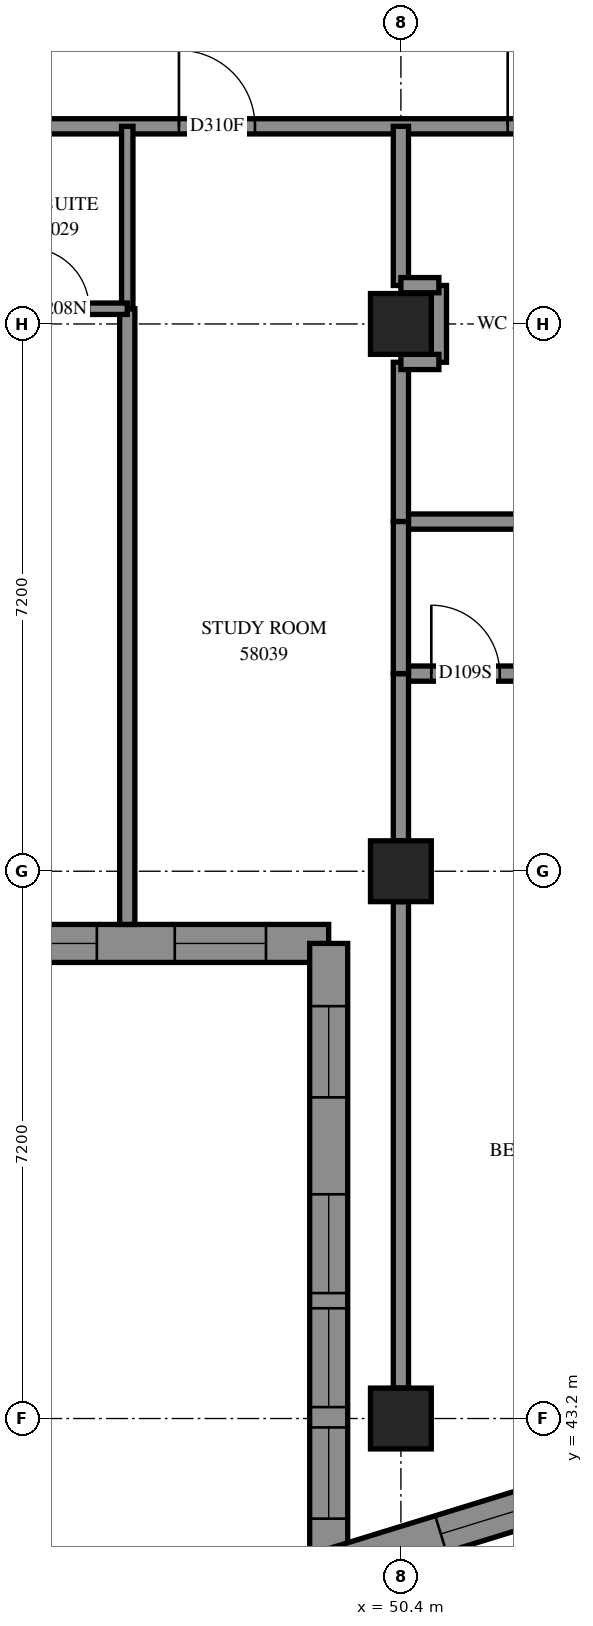
"""IFC4 building model, lengths in metres.
Left out: names, types, materials, properties, quantities, classifications, styles, units other than length and angle.
Written with IfcOpenShell. Run it as: python <this file> out.ifc"""

import sys

from ifc_helpers import new_model, si_unit, direction, frame, frame_2d, origin, origin_2d, place, context, subcontext, project, spatial, polyline, rectangle, outline, extrude, element, fill, save


model = new_model("IFC4")
c1 = context("Model", 3, precision=1e-05, world=origin(), true_north=direction((0.0, 1.0)))
c2 = subcontext(c1, "Body", "Model", "MODEL_VIEW")
j1 = project(units=[si_unit("LENGTHUNIT", "METRE"), si_unit("PLANEANGLEUNIT", "RADIAN")], contexts=[c1])
p1 = place(None, origin())
s1 = spatial("IfcSite", under=j1, at=p1, CompositionType="ELEMENT")
p2 = place(p1, origin())
s2 = spatial("IfcBuilding", under=s1, at=p2, CompositionType="ELEMENT")
p3 = place(p2, frame((0.0, 0.0, 213.4)))
s3 = spatial("IfcBuildingStorey", under=s2, at=p3, CompositionType="ELEMENT", Elevation=213.4)
for number, where, z_axis, x_axis in (
    (1, (50.4, 43.2, 0.0), (0.0, 0.0, 1.0), (1.0, 0.0, 0.0)),
    (2, (50.4, 50.4, 0.0), (0.0, 0.0, 1.0), (1.0, 0.0, 0.0)),
    (3, (50.4, 57.6, 0.0), (0.0, 0.0, 1.0), (1.0, 0.0, 0.0)),
):
    element("IfcColumn", number, at=place(p3, frame(where, z_axis=z_axis, x_axis=x_axis)), inside=s3, PredefinedType="COLUMN", context=c2, shape_type="SweptSolid", body=[
        extrude(rectangle(XDim=0.8, YDim=0.8, at=origin_2d()), origin(), (0.0, 0.0, 1.0), 3.1),
    ])
p4 = place(p3, frame((42.25, 49.45, 0.0), z_axis=(0.0, 0.0, 1.0), x_axis=(1.0, 0.0, 0.0)))
e4 = element("IfcWall", 4, at=p4, inside=s3, PredefinedType="SOLIDWALL", context=c2, shape_type="SweptSolid", body=[
    extrude(outline(polyline([(-0.25, -0.25), (6.95, -0.25), (7.45, 0.25), (0.25, 0.25), (-0.25, -0.25)])), origin(), (0.0, 0.0, 1.0), 3.1),
])
p5 = place(p4, frame((1.35, 0.0, 0.45)))
e5 = element("IfcOpeningElement", 5, at=p5, cuts=e4, PredefinedType="OPENING", context=c2, shape_type="SweptSolid", body=[
    extrude(rectangle(XDim=1.3, YDim=2.5, at=frame_2d((0.65, 1.25))), frame((0.0, 0.26, 0.0), z_axis=(0.0, -1.0, 0.0), x_axis=(1.0, 0.0, 0.0)), (0.0, 0.0, 1.0), 0.52),
])
p6 = place(p4, frame((2.85, 0.0, 0.45)))
e6 = element("IfcOpeningElement", 6, at=p6, cuts=e4, PredefinedType="OPENING", context=c2, shape_type="SweptSolid", body=[
    extrude(rectangle(XDim=1.3, YDim=2.5, at=frame_2d((0.65, 1.25))), frame((0.0, 0.26, 0.0), z_axis=(0.0, -1.0, 0.0), x_axis=(1.0, 0.0, 0.0)), (0.0, 0.0, 1.0), 0.52),
])
p7 = place(p4, frame((5.175, 0.0, 0.45)))
e7 = element("IfcOpeningElement", 7, at=p7, cuts=e4, PredefinedType="OPENING", context=c2, shape_type="SweptSolid", body=[
    extrude(rectangle(XDim=1.2, YDim=2.5, at=frame_2d((0.6, 1.25))), frame((0.0, 0.26, 0.0), z_axis=(0.0, -1.0, 0.0), x_axis=(1.0, 0.0, 0.0)), (0.0, 0.0, 1.0), 0.52),
])
p8 = place(p3, frame((49.45, 49.45, 0.0), z_axis=(0.0, 0.0, 1.0), x_axis=(0.0, -1.0, 0.0)))
e8 = element("IfcWall", 8, at=p8, inside=s3, PredefinedType="SOLIDWALL", context=c2, shape_type="SweptSolid", body=[
    extrude(outline(polyline([(0.25, -0.25), (8.562, -0.25), (7.885, 0.25), (-0.25, 0.25), (0.25, -0.25)])), origin(), (0.0, 0.0, 1.0), 3.1),
])
p9 = place(p8, frame((3.3, 0.0, 0.45)))
e9 = element("IfcOpeningElement", 9, at=p9, cuts=e8, PredefinedType="OPENING", context=c2, shape_type="SweptSolid", body=[
    extrude(rectangle(XDim=1.3, YDim=2.5, at=frame_2d((0.65, 1.25))), frame((0.0, 0.26, 0.0), z_axis=(0.0, -1.0, 0.0), x_axis=(1.0, 0.0, 0.0)), (0.0, 0.0, 1.0), 0.52),
])
p10 = place(p8, frame((4.8, 0.0, 0.45)))
e10 = element("IfcOpeningElement", 10, at=p10, cuts=e8, PredefinedType="OPENING", context=c2, shape_type="SweptSolid", body=[
    extrude(rectangle(XDim=1.3, YDim=2.5, at=frame_2d((0.65, 1.25))), frame((0.0, 0.26, 0.0), z_axis=(0.0, -1.0, 0.0), x_axis=(1.0, 0.0, 0.0)), (0.0, 0.0, 1.0), 0.52),
])
p11 = place(p8, frame((0.825, 0.0, 0.45)))
e11 = element("IfcOpeningElement", 11, at=p11, cuts=e8, PredefinedType="OPENING", context=c2, shape_type="SweptSolid", body=[
    extrude(rectangle(XDim=1.2, YDim=2.5, at=frame_2d((0.6, 1.25))), frame((0.0, 0.26, 0.0), z_axis=(0.0, -1.0, 0.0), x_axis=(1.0, 0.0, 0.0)), (0.0, 0.0, 1.0), 0.52),
])
p12 = place(p8, frame((6.367, 0.0, 0.45)))
e12 = element("IfcOpeningElement", 12, at=p12, cuts=e8, PredefinedType="OPENING", context=c2, shape_type="SweptSolid", body=[
    extrude(rectangle(XDim=1.2, YDim=2.5, at=frame_2d((0.6, 1.25))), frame((0.0, 0.26, 0.0), z_axis=(0.0, -1.0, 0.0), x_axis=(1.0, 0.0, 0.0)), (0.0, 0.0, 1.0), 0.52),
])
p13 = place(p3, frame((49.45, 41.227, 0.0), z_axis=(0.0, 0.0, 1.0), x_axis=(0.9556476946, 0.2945122812, 0.0)))
e13 = element("IfcWall", 13, at=p13, inside=s3, PredefinedType="SOLIDWALL", context=c2, shape_type="SweptSolid", body=[
    extrude(outline(polyline([(-0.339, -0.25), (3.437, -0.25), (3.549, 0.25), (0.339, 0.25), (-0.339, -0.25)])), origin(), (0.0, 0.0, 1.0), 3.1),
])
p14 = place(p13, frame((1.544, 0.0, 0.45)))
e14 = element("IfcOpeningElement", 14, at=p14, cuts=e13, PredefinedType="OPENING", context=c2, shape_type="SweptSolid", body=[
    extrude(rectangle(XDim=1.2, YDim=2.5, at=frame_2d((0.6, 1.25))), frame((0.0, 0.26, 0.0), z_axis=(0.0, -1.0, 0.0), x_axis=(1.0, 0.0, 0.0)), (0.0, 0.0, 1.0), 0.52),
])
p15 = place(p3, frame((36.0, 60.2, 0.0), z_axis=(0.0, 0.0, 1.0), x_axis=(1.0, 0.0, 0.0)))
e15 = element("IfcWall", 15, at=p15, inside=s3, PredefinedType="PARTITIONING", context=c2, shape_type="SweptSolid", body=[
    extrude(rectangle(XDim=17.0, YDim=0.2, at=frame_2d((8.5, 0.0))), origin(), (0.0, 0.0, 1.0), 3.1),
])
p16 = place(p15, frame((4.125, 0.0, 0.0)))
e16 = element("IfcOpeningElement", 16, at=p16, cuts=e15, PredefinedType="OPENING", context=c2, shape_type="SweptSolid", body=[
    extrude(rectangle(XDim=1.0, YDim=2.1, at=frame_2d((0.5, 1.05))), frame((0.0, 0.11, 0.0), z_axis=(0.0, -1.0, 0.0), x_axis=(1.0, 0.0, 0.0)), (0.0, 0.0, 1.0), 0.22),
])
p17 = place(p15, frame((7.6, 0.0, 0.0)))
e17 = element("IfcOpeningElement", 17, at=p17, cuts=e15, PredefinedType="OPENING", context=c2, shape_type="SweptSolid", body=[
    extrude(rectangle(XDim=0.9, YDim=2.1, at=frame_2d((0.45, 1.05))), frame((0.0, 0.11, 0.0), z_axis=(0.0, -1.0, 0.0), x_axis=(1.0, 0.0, 0.0)), (0.0, 0.0, 1.0), 0.22),
])
p18 = place(p15, frame((11.48, 0.0, 0.0)))
e18 = element("IfcOpeningElement", 18, at=p18, cuts=e15, PredefinedType="OPENING", context=c2, shape_type="SweptSolid", body=[
    extrude(rectangle(XDim=1.0, YDim=2.1, at=frame_2d((0.5, 1.05))), frame((0.0, 0.11, 0.0), z_axis=(0.0, -1.0, 0.0), x_axis=(1.0, 0.0, 0.0)), (0.0, 0.0, 1.0), 0.22),
])
p19 = place(p15, frame((15.805, 0.0, 0.0)))
e19 = element("IfcOpeningElement", 19, at=p19, cuts=e15, PredefinedType="OPENING", context=c2, shape_type="SweptSolid", body=[
    extrude(rectangle(XDim=1.0, YDim=2.1, at=frame_2d((0.5, 1.05))), frame((0.0, 0.11, 0.0), z_axis=(0.0, -1.0, 0.0), x_axis=(1.0, 0.0, 0.0)), (0.0, 0.0, 1.0), 0.22),
])
p20 = place(p3, frame((46.8, 49.7, 0.0), z_axis=(0.0, 0.0, 1.0), x_axis=(0.0, 1.0, 0.0)))
e20 = element("IfcWall", 20, at=p20, inside=s3, PredefinedType="PARTITIONING", context=c2, shape_type="SweptSolid", body=[
    extrude(rectangle(XDim=8.1, YDim=0.2, at=frame_2d((4.05, 0.0))), origin(), (0.0, 0.0, 1.0), 3.1),
])
p21 = place(p3, frame((50.4, 43.6, 0.0), z_axis=(0.0, 0.0, 1.0), x_axis=(0.0, 1.0, 0.0)))
e21 = element("IfcWall", 21, at=p21, inside=s3, PredefinedType="PARTITIONING", context=c2, shape_type="SweptSolid", body=[
    extrude(rectangle(XDim=6.4, YDim=0.2, at=frame_2d((3.2, 0.0))), origin(), (0.0, 0.0, 1.0), 2.6),
])
p22 = place(p3, frame((50.4, 53.0, 0.0), z_axis=(0.0, 0.0, 1.0), x_axis=(1.0, 0.0, 0.0)))
e22 = element("IfcWall", 22, at=p22, inside=s3, PredefinedType="PARTITIONING", context=c2, shape_type="SweptSolid", body=[
    extrude(rectangle(XDim=5.2, YDim=0.2, at=frame_2d((2.6, 0.0))), origin(), (0.0, 0.0, 1.0), 3.1),
])
p23 = place(p22, frame((0.4, 0.0, 0.0)))
e23 = element("IfcOpeningElement", 23, at=p23, cuts=e22, PredefinedType="OPENING", context=c2, shape_type="SweptSolid", body=[
    extrude(rectangle(XDim=0.9, YDim=2.1, at=frame_2d((0.45, 1.05))), frame((0.0, 0.11, 0.0), z_axis=(0.0, -1.0, 0.0), x_axis=(1.0, 0.0, 0.0)), (0.0, 0.0, 1.0), 0.22),
])
p24 = place(p22, frame((3.946, 0.0, 0.0)))
e24 = element("IfcOpeningElement", 24, at=p24, cuts=e22, PredefinedType="OPENING", context=c2, shape_type="SweptSolid", body=[
    extrude(rectangle(XDim=1.0, YDim=2.1, at=frame_2d((0.5, 1.05))), frame((0.0, 0.11, 0.0), z_axis=(0.0, -1.0, 0.0), x_axis=(1.0, 0.0, 0.0)), (0.0, 0.0, 1.0), 0.22),
])
p25 = place(p3, frame((50.4, 55.0, 0.0), z_axis=(0.0, 0.0, 1.0), x_axis=(1.0, 0.0, 0.0)))
e25 = element("IfcWall", 25, at=p25, inside=s3, PredefinedType="PARTITIONING", context=c2, shape_type="SweptSolid", body=[
    extrude(rectangle(XDim=2.6, YDim=0.2, at=frame_2d((1.3, 0.0))), origin(), (0.0, 0.0, 1.0), 3.1),
])
p26 = place(p3, frame((46.8, 57.8, 0.0), z_axis=(0.0, 0.0, 1.0), x_axis=(0.0, 1.0, 0.0)))
e26 = element("IfcWall", 26, at=p26, inside=s3, PredefinedType="PARTITIONING", context=c2, shape_type="SweptSolid", body=[
    extrude(rectangle(XDim=2.4, YDim=0.15, at=frame_2d((1.2, 0.0))), origin(), (0.0, 0.0, 1.0), 3.1),
])
p27 = place(p3, frame((50.4, 50.8, 0.0), z_axis=(0.0, 0.0, 1.0), x_axis=(0.0, 1.0, 0.0)))
e27 = element("IfcWall", 27, at=p27, inside=s3, PredefinedType="PARTITIONING", context=c2, shape_type="SweptSolid", body=[
    extrude(rectangle(XDim=2.2, YDim=0.2, at=frame_2d((1.1, 0.0))), origin(), (0.0, 0.0, 1.0), 3.1),
])
p28 = place(p3, frame((50.4, 55.0, 0.0), z_axis=(0.0, 0.0, 1.0), x_axis=(0.0, 1.0, 0.0)))
e28 = element("IfcWall", 28, at=p28, inside=s3, PredefinedType="PARTITIONING", context=c2, shape_type="SweptSolid", body=[
    extrude(rectangle(XDim=2.096, YDim=0.2, at=frame_2d((1.048, 0.0))), origin(), (0.0, 0.0, 1.0), 3.1),
])
p29 = place(p3, frame((50.4, 58.106, 0.0), z_axis=(0.0, 0.0, 1.0), x_axis=(0.0, 1.0, 0.0)))
e29 = element("IfcWall", 29, at=p29, inside=s3, PredefinedType="PARTITIONING", context=c2, shape_type="SweptSolid", body=[
    extrude(rectangle(XDim=2.094, YDim=0.2, at=frame_2d((1.047, 0.0))), origin(), (0.0, 0.0, 1.0), 3.1),
])
p30 = place(p3, frame((50.4, 53.0, 0.0), z_axis=(0.0, 0.0, 1.0), x_axis=(0.0, 1.0, 0.0)))
e30 = element("IfcWall", 30, at=p30, inside=s3, PredefinedType="PARTITIONING", context=c2, shape_type="SweptSolid", body=[
    extrude(rectangle(XDim=2.0, YDim=0.2, at=frame_2d((1.0, 0.0))), origin(), (0.0, 0.0, 1.0), 3.1),
])
p31 = place(p3, frame((44.9, 57.8, 0.0), z_axis=(0.0, 0.0, 1.0), x_axis=(1.0, 0.0, 0.0)))
e31 = element("IfcWall", 31, at=p31, inside=s3, PredefinedType="PARTITIONING", context=c2, shape_type="SweptSolid", body=[
    extrude(rectangle(XDim=1.9, YDim=0.15, at=frame_2d((0.95, 0.0))), origin(), (0.0, 0.0, 1.0), 3.1),
])
p32 = place(p31, frame((0.598, 0.0, 0.0)))
e32 = element("IfcOpeningElement", 32, at=p32, cuts=e31, PredefinedType="OPENING", context=c2, shape_type="SweptSolid", body=[
    extrude(rectangle(XDim=0.8, YDim=2.1, at=frame_2d((0.4, 1.05))), frame((0.0, 0.085, 0.0), z_axis=(0.0, -1.0, 0.0), x_axis=(1.0, 0.0, 0.0)), (0.0, 0.0, 1.0), 0.17),
])
p33 = place(p3, frame((50.9, 57.096, 0.0), z_axis=(0.0, 0.0, 1.0), x_axis=(0.0, 1.0, 0.0)))
e33 = element("IfcWall", 33, at=p33, inside=s3, PredefinedType="PARTITIONING", context=c2, shape_type="SweptSolid", body=[
    extrude(rectangle(XDim=1.01, YDim=0.2, at=frame_2d((0.505, 0.0))), origin(), (0.0, 0.0, 1.0), 3.1),
])
for number, where, z_axis, x_axis in (
    (34, (50.4, 58.11, 0.0), (0.0, 0.0, 1.0), (1.0, 0.0, 0.0)),
    (35, (50.4, 57.1, 0.0), (0.0, 0.0, 1.0), (1.0, 0.0, 0.0)),
):
    element("IfcWall", number, at=place(p3, frame(where, z_axis=z_axis, x_axis=x_axis)), inside=s3, PredefinedType="PARTITIONING", context=c2, shape_type="SweptSolid", body=[
        extrude(rectangle(XDim=0.5, YDim=0.2, at=frame_2d((0.25, 0.0))), origin(), (0.0, 0.0, 1.0), 3.1),
    ])
p34 = place(p6, origin())
e36 = element("IfcWindow", 36, at=p34, inside=s3, PartitioningType="SINGLE_PANEL", PredefinedType="WINDOW", context=c2, shape_type="SweptSolid", body=[
    extrude(rectangle(XDim=1.3, YDim=2.5, at=frame_2d((0.65, 1.25))), frame((0.0, 0.18, 0.0), z_axis=(0.0, -1.0, 0.0), x_axis=(1.0, 0.0, 0.0)), (0.0, 0.0, 1.0), 0.06),
])
fill(e6, e36)
p35 = place(p7, origin())
e37 = element("IfcWindow", 37, at=p35, inside=s3, PartitioningType="SINGLE_PANEL", PredefinedType="WINDOW", context=c2, shape_type="SweptSolid", body=[
    extrude(rectangle(XDim=1.2, YDim=2.5, at=frame_2d((0.6, 1.25))), frame((0.0, 0.18, 0.0), z_axis=(0.0, -1.0, 0.0), x_axis=(1.0, 0.0, 0.0)), (0.0, 0.0, 1.0), 0.06),
])
fill(e7, e37)
p36 = place(p9, origin())
e38 = element("IfcWindow", 38, at=p36, inside=s3, PartitioningType="SINGLE_PANEL", PredefinedType="WINDOW", context=c2, shape_type="SweptSolid", body=[
    extrude(rectangle(XDim=1.3, YDim=2.5, at=frame_2d((0.65, 1.25))), frame((0.0, 0.18, 0.0), z_axis=(0.0, -1.0, 0.0), x_axis=(1.0, 0.0, 0.0)), (0.0, 0.0, 1.0), 0.06),
])
fill(e9, e38)
p37 = place(p10, origin())
e39 = element("IfcWindow", 39, at=p37, inside=s3, PartitioningType="SINGLE_PANEL", PredefinedType="WINDOW", context=c2, shape_type="SweptSolid", body=[
    extrude(rectangle(XDim=1.3, YDim=2.5, at=frame_2d((0.65, 1.25))), frame((0.0, 0.18, 0.0), z_axis=(0.0, -1.0, 0.0), x_axis=(1.0, 0.0, 0.0)), (0.0, 0.0, 1.0), 0.06),
])
fill(e10, e39)
p38 = place(p11, origin())
e40 = element("IfcWindow", 40, at=p38, inside=s3, PartitioningType="SINGLE_PANEL", PredefinedType="WINDOW", context=c2, shape_type="SweptSolid", body=[
    extrude(rectangle(XDim=1.2, YDim=2.5, at=frame_2d((0.6, 1.25))), frame((0.0, 0.18, 0.0), z_axis=(0.0, -1.0, 0.0), x_axis=(1.0, 0.0, 0.0)), (0.0, 0.0, 1.0), 0.06),
])
fill(e11, e40)
p39 = place(p12, origin())
e41 = element("IfcWindow", 41, at=p39, inside=s3, PartitioningType="SINGLE_PANEL", PredefinedType="WINDOW", context=c2, shape_type="SweptSolid", body=[
    extrude(rectangle(XDim=1.2, YDim=2.5, at=frame_2d((0.6, 1.25))), frame((0.0, 0.18, 0.0), z_axis=(0.0, -1.0, 0.0), x_axis=(1.0, 0.0, 0.0)), (0.0, 0.0, 1.0), 0.06),
])
fill(e12, e41)
p40 = place(p14, origin())
e42 = element("IfcWindow", 42, at=p40, inside=s3, PartitioningType="SINGLE_PANEL", PredefinedType="WINDOW", context=c2, shape_type="SweptSolid", body=[
    extrude(rectangle(XDim=1.2, YDim=2.5, at=frame_2d((0.6, 1.25))), frame((0.0, 0.18, 0.0), z_axis=(0.0, -1.0, 0.0), x_axis=(1.0, 0.0, 0.0)), (0.0, 0.0, 1.0), 0.06),
])
fill(e14, e42)
p41 = place(p32, origin())
e43 = element("IfcDoor", 43, at=p41, inside=s3, OperationType="SINGLE_SWING_RIGHT", PredefinedType="DOOR", context=c2, shape_type="SweptSolid", body=[
    extrude(rectangle(XDim=0.8, YDim=2.1, at=frame_2d((0.4, 1.05))), frame((0.0, 0.025, 0.0), z_axis=(0.0, -1.0, 0.0), x_axis=(1.0, 0.0, 0.0)), (0.0, 0.0, 1.0), 0.05),
])
fill(e32, e43)
p42 = place(p18, origin())
e44 = element("IfcDoor", 44, at=p42, inside=s3, OperationType="SINGLE_SWING_RIGHT", PredefinedType="DOOR", context=c2, shape_type="SweptSolid", body=[
    extrude(rectangle(XDim=1.0, YDim=2.1, at=frame_2d((0.5, 1.05))), frame((0.0, 0.025, 0.0), z_axis=(0.0, -1.0, 0.0), x_axis=(1.0, 0.0, 0.0)), (0.0, 0.0, 1.0), 0.05),
])
fill(e18, e44)
p43 = place(p19, origin())
e45 = element("IfcDoor", 45, at=p43, inside=s3, OperationType="SINGLE_SWING_LEFT", PredefinedType="DOOR", context=c2, shape_type="SweptSolid", body=[
    extrude(rectangle(XDim=1.0, YDim=2.1, at=frame_2d((0.5, 1.05))), frame((0.0, 0.025, 0.0), z_axis=(0.0, -1.0, 0.0), x_axis=(1.0, 0.0, 0.0)), (0.0, 0.0, 1.0), 0.05),
])
fill(e19, e45)
p44 = place(p23, origin())
e46 = element("IfcDoor", 46, at=p44, inside=s3, OperationType="SINGLE_SWING_LEFT", PredefinedType="DOOR", context=c2, shape_type="SweptSolid", body=[
    extrude(rectangle(XDim=0.9, YDim=2.1, at=frame_2d((0.45, 1.05))), frame((0.0, 0.025, 0.0), z_axis=(0.0, -1.0, 0.0), x_axis=(1.0, 0.0, 0.0)), (0.0, 0.0, 1.0), 0.05),
])
fill(e23, e46)
save(model, sys.argv[1])
